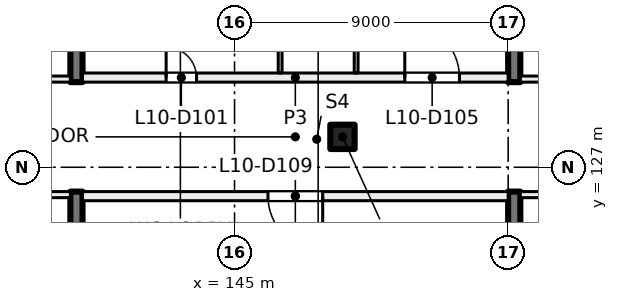
"""IFC4 building model, lengths in metres.
Left out: names, types, materials, properties, quantities, classifications, styles, units other than length and angle.
Written with IfcOpenShell. Run it as: python <this file> out.ifc"""

import sys

from ifc_helpers import new_model, si_unit, direction, frame, frame_2d, origin, origin_2d, place, context, subcontext, project, spatial, rectangle, extrude, element, fill, save


model = new_model("IFC4")
c1 = context("Model", 3, precision=1e-05, world=origin(), true_north=direction((0.0, 1.0)))
c2 = subcontext(c1, "Body", "Model", "MODEL_VIEW")
j1 = project(units=[si_unit("LENGTHUNIT", "METRE"), si_unit("PLANEANGLEUNIT", "RADIAN")], contexts=[c1])
p1 = place(None, origin())
s1 = spatial("IfcSite", under=j1, at=p1, CompositionType="ELEMENT")
p2 = place(p1, origin())
s2 = spatial("IfcBuilding", under=s1, at=p2, CompositionType="ELEMENT")
p3 = place(p2, frame((0.0, 0.0, 47.5)))
s3 = spatial("IfcBuildingStorey", under=s2, at=p3, CompositionType="ELEMENT", Elevation=47.5)
p4 = place(p3, frame((148.55, 128.0, 0.0), z_axis=(0.0, 0.0, 1.0), x_axis=(1.0, 0.0, 0.0)))
e1 = element("IfcColumn", 1, at=p4, inside=s3, PredefinedType="COLUMN", context=c2, shape_type="SweptSolid", body=[
    extrude(rectangle(XDim=0.8, YDim=0.8, at=origin_2d()), origin(), (0.0, 0.0, 1.0), 4.0),
])
for number, where, z_axis, x_axis in (
    (2, (139.8, 117.6, 0.0), (0.0, 0.0, 1.0), (0.0, 1.0, 0.0)),
    (3, (139.8, 129.8, 0.0), (0.0, 0.0, 1.0), (0.0, 1.0, 0.0)),
    (4, (154.2, 138.4, 0.0), (0.0, 0.0, 1.0), (0.0, -1.0, 0.0)),
    (5, (154.2, 126.2, 0.0), (0.0, 0.0, 1.0), (0.0, -1.0, 0.0)),
):
    element("IfcWall", number, at=place(p3, frame(where, z_axis=z_axis, x_axis=x_axis)), inside=s3, PredefinedType="SHEAR", context=c2, shape_type="SweptSolid", body=[
        extrude(rectangle(XDim=8.6, YDim=0.4, at=frame_2d((4.3, 0.0))), origin(), (0.0, 0.0, 1.0), 4.0),
    ])
p5 = place(p3, frame((135.0, 129.9, 0.0), z_axis=(0.0, 0.0, 1.0), x_axis=(1.0, 0.0, 0.0)))
e6 = element("IfcWall", 6, at=p5, inside=s3, PredefinedType="PARTITIONING", context=c2, shape_type="SweptSolid", body=[
    extrude(rectangle(XDim=4.6, YDim=0.2, at=frame_2d((2.3, 0.0))), origin(), (0.0, 0.0, 1.0), 3.625),
])
p6 = place(p5, frame((1.7, 0.0, 0.0)))
e7 = element("IfcOpeningElement", 7, at=p6, cuts=e6, PredefinedType="OPENING", context=c2, shape_type="SweptSolid", body=[
    extrude(rectangle(XDim=1.2, YDim=2.1, at=frame_2d((0.6, 1.05))), frame((0.0, 0.11, 0.0), z_axis=(0.0, -1.0, 0.0), x_axis=(1.0, 0.0, 0.0)), (0.0, 0.0, 1.0), 0.22),
])
p7 = place(p3, frame((139.6, 126.1, 0.0), z_axis=(0.0, 0.0, 1.0), x_axis=(-1.0, 0.0, 0.0)))
e8 = element("IfcWall", 8, at=p7, inside=s3, PredefinedType="PARTITIONING", context=c2, shape_type="SweptSolid", body=[
    extrude(rectangle(XDim=4.6, YDim=0.2, at=frame_2d((2.3, 0.0))), origin(), (0.0, 0.0, 1.0), 3.625),
])
p8 = place(p7, frame((1.7, 0.0, 0.0)))
e9 = element("IfcOpeningElement", 9, at=p8, cuts=e8, PredefinedType="OPENING", context=c2, shape_type="SweptSolid", body=[
    extrude(rectangle(XDim=1.2, YDim=2.1, at=frame_2d((0.6, 1.05))), frame((0.0, 0.11, 0.0), z_axis=(0.0, -1.0, 0.0), x_axis=(1.0, 0.0, 0.0)), (0.0, 0.0, 1.0), 0.22),
])
p9 = place(p3, frame((163.8, 126.1, 0.0), z_axis=(0.0, 0.0, 1.0), x_axis=(-1.0, 0.0, 0.0)))
e10 = element("IfcWall", 10, at=p9, inside=s3, PredefinedType="PARTITIONING", context=c2, shape_type="SweptSolid", body=[
    extrude(rectangle(XDim=9.4, YDim=0.2, at=frame_2d((4.7, 0.0))), origin(), (0.0, 0.0, 1.0), 3.625),
])
p10 = place(p9, frame((4.1, 0.0, 0.0)))
e11 = element("IfcOpeningElement", 11, at=p10, cuts=e10, PredefinedType="OPENING", context=c2, shape_type="SweptSolid", body=[
    extrude(rectangle(XDim=1.2, YDim=2.1, at=frame_2d((0.6, 1.05))), frame((0.0, 0.11, 0.0), z_axis=(0.0, -1.0, 0.0), x_axis=(1.0, 0.0, 0.0)), (0.0, 0.0, 1.0), 0.22),
])
p11 = place(p3, frame((154.4, 129.9, 0.0), z_axis=(0.0, 0.0, 1.0), x_axis=(1.0, 0.0, 0.0)))
e12 = element("IfcWall", 12, at=p11, inside=s3, PredefinedType="PARTITIONING", context=c2, shape_type="SweptSolid", body=[
    extrude(rectangle(XDim=9.4, YDim=0.2, at=frame_2d((4.7, 0.0))), origin(), (0.0, 0.0, 1.0), 3.625),
])
p12 = place(p11, frame((4.1, 0.0, 0.0)))
e13 = element("IfcOpeningElement", 13, at=p12, cuts=e12, PredefinedType="OPENING", context=c2, shape_type="SweptSolid", body=[
    extrude(rectangle(XDim=1.2, YDim=2.1, at=frame_2d((0.6, 1.05))), frame((0.0, 0.11, 0.0), z_axis=(0.0, -1.0, 0.0), x_axis=(1.0, 0.0, 0.0)), (0.0, 0.0, 1.0), 0.22),
])
p13 = place(p3, frame((140.0, 129.95, 0.0), z_axis=(0.0, 0.0, 1.0), x_axis=(1.0, 0.0, 0.0)))
e14 = element("IfcWall", 14, at=p13, inside=s3, PredefinedType="PARTITIONING", context=c2, shape_type="SweptSolid", body=[
    extrude(rectangle(XDim=14.0, YDim=0.3, at=frame_2d((7.0, 0.0))), origin(), (0.0, 0.0, 1.0), 3.625),
])
p14 = place(p13, frame((2.75, 0.0, 0.0)))
e15 = element("IfcOpeningElement", 15, at=p14, cuts=e14, PredefinedType="OPENING", context=c2, shape_type="SweptSolid", body=[
    extrude(rectangle(XDim=1.0, YDim=2.1, at=frame_2d((0.5, 1.05))), frame((0.0, 0.16, 0.0), z_axis=(0.0, -1.0, 0.0), x_axis=(1.0, 0.0, 0.0)), (0.0, 0.0, 1.0), 0.32),
])
p15 = place(p13, frame((10.6, 0.0, 0.0)))
e16 = element("IfcOpeningElement", 16, at=p15, cuts=e14, PredefinedType="OPENING", context=c2, shape_type="SweptSolid", body=[
    extrude(rectangle(XDim=1.8, YDim=2.1, at=frame_2d((0.9, 1.05))), frame((0.0, 0.16, 0.0), z_axis=(0.0, -1.0, 0.0), x_axis=(1.0, 0.0, 0.0)), (0.0, 0.0, 1.0), 0.32),
])
p16 = place(p3, frame((146.5, 132.688, 0.0), z_axis=(0.0, 0.0, 1.0), x_axis=(0.0, -1.0, 0.0)))
e17 = element("IfcWall", 17, at=p16, inside=s3, PredefinedType="PARTITIONING", context=c2, shape_type="SweptSolid", body=[
    extrude(rectangle(XDim=2.588, YDim=0.125, at=frame_2d((1.294, 0.0))), origin(), (0.0, 0.0, 1.0), 3.625),
])
p17 = place(p16, frame((0.794, 0.0, 0.0)))
e18 = element("IfcOpeningElement", 18, at=p17, cuts=e17, PredefinedType="OPENING", context=c2, shape_type="SweptSolid", body=[
    extrude(rectangle(XDim=1.0, YDim=2.1, at=frame_2d((0.5, 1.05))), frame((0.0, 0.073, 0.0), z_axis=(0.0, -1.0, 0.0), x_axis=(1.0, 0.0, 0.0)), (0.0, 0.0, 1.0), 0.145),
])
p18 = place(p3, frame((149.0, 139.012, 0.0), z_axis=(0.0, 0.0, 1.0), x_axis=(0.0, -1.0, 0.0)))
e19 = element("IfcWall", 19, at=p18, inside=s3, PredefinedType="PARTITIONING", context=c2, shape_type="SweptSolid", body=[
    extrude(rectangle(XDim=8.912, YDim=0.125, at=frame_2d((4.456, 0.0))), origin(), (0.0, 0.0, 1.0), 3.625),
])
p19 = place(p3, frame((154.0, 126.05, 0.0), z_axis=(0.0, 0.0, 1.0), x_axis=(-1.0, 0.0, 0.0)))
e20 = element("IfcWall", 20, at=p19, inside=s3, PredefinedType="PARTITIONING", context=c2, shape_type="SweptSolid", body=[
    extrude(rectangle(XDim=14.0, YDim=0.3, at=frame_2d((7.0, 0.0))), origin(), (0.0, 0.0, 1.0), 3.625),
])
p20 = place(p19, frame((6.1, 0.0, 0.0)))
e21 = element("IfcOpeningElement", 21, at=p20, cuts=e20, PredefinedType="OPENING", context=c2, shape_type="SweptSolid", body=[
    extrude(rectangle(XDim=1.8, YDim=2.1, at=frame_2d((0.9, 1.05))), frame((0.0, 0.16, 0.0), z_axis=(0.0, -1.0, 0.0), x_axis=(1.0, 0.0, 0.0)), (0.0, 0.0, 1.0), 0.32),
])
p21 = place(p14, origin())
e22 = element("IfcDoor", 22, at=p21, inside=s3, OperationType="SINGLE_SWING_LEFT", PredefinedType="DOOR", context=c2, shape_type="SweptSolid", body=[
    extrude(rectangle(XDim=1.0, YDim=2.1, at=frame_2d((0.5, 1.05))), frame((0.0, 0.025, 0.0), z_axis=(0.0, -1.0, 0.0), x_axis=(1.0, 0.0, 0.0)), (0.0, 0.0, 1.0), 0.05),
])
fill(e15, e22)
p22 = place(p15, origin())
e23 = element("IfcDoor", 23, at=p22, inside=s3, OperationType="DOUBLE_DOOR_SINGLE_SWING", PredefinedType="DOOR", context=c2, shape_type="SweptSolid", body=[
    extrude(rectangle(XDim=1.8, YDim=2.1, at=frame_2d((0.9, 1.05))), frame((0.0, 0.025, 0.0), z_axis=(0.0, -1.0, 0.0), x_axis=(1.0, 0.0, 0.0)), (0.0, 0.0, 1.0), 0.05),
])
fill(e16, e23)
p23 = place(p20, origin())
e24 = element("IfcDoor", 24, at=p23, inside=s3, OperationType="DOUBLE_DOOR_SINGLE_SWING", PredefinedType="DOOR", context=c2, shape_type="SweptSolid", body=[
    extrude(rectangle(XDim=1.8, YDim=2.1, at=frame_2d((0.9, 1.05))), frame((0.0, 0.025, 0.0), z_axis=(0.0, -1.0, 0.0), x_axis=(1.0, 0.0, 0.0)), (0.0, 0.0, 1.0), 0.05),
])
fill(e21, e24)
save(model, sys.argv[1])
